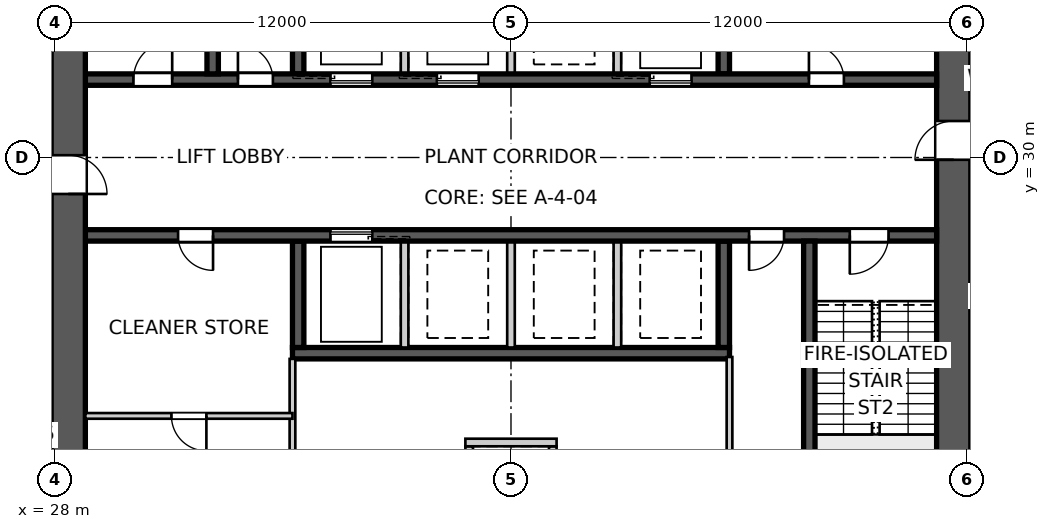
"""IFC4 building model, lengths in metres.
Left out: names, types, materials, properties, quantities, classifications, styles, units other than length and angle.
Written with IfcOpenShell. Run it as: python <this file> out.ifc"""

import sys

from ifc_helpers import new_model, si_unit, direction, frame, frame_2d, origin, place, context, subcontext, project, spatial, polyline, rectangle, outline, extrude, element, fill, save


model = new_model("IFC4")
c1 = context("Model", 3, precision=1e-05, world=origin(), true_north=direction((0.0, 1.0)))
c2 = subcontext(c1, "Body", "Model", "MODEL_VIEW")
j1 = project(units=[si_unit("LENGTHUNIT", "METRE"), si_unit("PLANEANGLEUNIT", "RADIAN")], contexts=[c1])
p1 = place(None, origin())
s1 = spatial("IfcSite", under=j1, at=p1, CompositionType="ELEMENT")
p2 = place(p1, origin())
s2 = spatial("IfcBuilding", under=s1, at=p2, CompositionType="ELEMENT")
p3 = place(p2, frame((0.0, 0.0, 74.4)))
s3 = spatial("IfcBuildingStorey", under=s2, at=p3, CompositionType="ELEMENT", Elevation=74.4)
p4 = place(p3, frame((51.65, 18.8, 0.0), z_axis=(0.0, 0.0, 1.0), x_axis=(0.0, 1.0, 0.0)))
e1 = element("IfcWall", 1, at=p4, inside=s3, PredefinedType="SHEAR", context=c2, shape_type="SweptSolid", body=[
    extrude(outline(polyline([(0.0, -0.45), (22.4, -0.45), (22.4, -0.025), (22.85, -0.025), (22.85, 0.025), (22.4, 0.025), (22.4, 0.45), (0.0, 0.45), (0.0, 0.025), (-0.45, 0.025), (-0.45, -0.025), (0.0, -0.025), (0.0, -0.45)])), origin(), (0.0, 0.0, 1.0), 5.0),
])
p5 = place(p4, frame((11.14, 0.0, 0.0)))
e2 = element("IfcOpeningElement", 2, at=p5, cuts=e1, PredefinedType="OPENING", context=c2, shape_type="SweptSolid", body=[
    extrude(rectangle(XDim=1.02, YDim=2.4, at=frame_2d((0.51, 1.2))), frame((0.0, 0.46, 0.0), z_axis=(0.0, -1.0, 0.0), x_axis=(1.0, 0.0, 0.0)), (0.0, 0.0, 1.0), 0.92),
])
p6 = place(p3, frame((28.35, 41.2, 0.0), z_axis=(0.0, 0.0, 1.0), x_axis=(0.0, -1.0, 0.0)))
e3 = element("IfcWall", 3, at=p6, inside=s3, PredefinedType="SHEAR", context=c2, shape_type="SweptSolid", body=[
    extrude(outline(polyline([(0.0, -0.45), (22.4, -0.45), (22.4, -0.025), (22.85, -0.025), (22.85, 0.025), (22.4, 0.025), (22.4, 0.45), (0.0, 0.45), (0.0, 0.025), (-0.45, 0.025), (-0.45, -0.025), (0.0, -0.025), (0.0, -0.45)])), origin(), (0.0, 0.0, 1.0), 5.0),
])
p7 = place(p6, frame((11.14, 0.0, 0.0)))
e4 = element("IfcOpeningElement", 4, at=p7, cuts=e3, PredefinedType="OPENING", context=c2, shape_type="SweptSolid", body=[
    extrude(rectangle(XDim=1.02, YDim=2.4, at=frame_2d((0.51, 1.2))), frame((0.0, 0.46, 0.0), z_axis=(0.0, -1.0, 0.0), x_axis=(1.0, 0.0, 0.0)), (0.0, 0.0, 1.0), 0.92),
])
p8 = place(p3, frame((28.8, 32.05, 0.0), z_axis=(0.0, 0.0, 1.0), x_axis=(1.0, 0.0, 0.0)))
e5 = element("IfcWall", 5, at=p8, inside=s3, PredefinedType="SHEAR", context=c2, shape_type="SweptSolid", body=[
    extrude(rectangle(XDim=22.4, YDim=0.3, at=frame_2d((11.2, 0.0))), origin(), (0.0, 0.0, 1.0), 5.0),
])
p9 = place(p8, frame((19.04, 0.0, 0.0)))
e6 = element("IfcOpeningElement", 6, at=p9, cuts=e5, PredefinedType="OPENING", context=c2, shape_type="SweptSolid", body=[
    extrude(rectangle(XDim=0.92, YDim=2.1, at=frame_2d((0.46, 1.05))), frame((0.0, 0.16, 0.0), z_axis=(0.0, -1.0, 0.0), x_axis=(1.0, 0.0, 0.0)), (0.0, 0.0, 1.0), 0.32),
])
p10 = place(p8, frame((1.265, 0.0, 0.0)))
e7 = element("IfcOpeningElement", 7, at=p10, cuts=e5, PredefinedType="OPENING", context=c2, shape_type="SweptSolid", body=[
    extrude(rectangle(XDim=1.02, YDim=2.1, at=frame_2d((0.51, 1.05))), frame((0.0, 0.16, 0.0), z_axis=(0.0, -1.0, 0.0), x_axis=(1.0, 0.0, 0.0)), (0.0, 0.0, 1.0), 0.32),
])
p11 = place(p8, frame((4.015, 0.0, 0.0)))
e8 = element("IfcOpeningElement", 8, at=p11, cuts=e5, PredefinedType="OPENING", context=c2, shape_type="SweptSolid", body=[
    extrude(rectangle(XDim=0.92, YDim=2.1, at=frame_2d((0.46, 1.05))), frame((0.0, 0.16, 0.0), z_axis=(0.0, -1.0, 0.0), x_axis=(1.0, 0.0, 0.0)), (0.0, 0.0, 1.0), 0.32),
])
p12 = place(p8, frame((6.45, 0.0, 0.0)))
e9 = element("IfcOpeningElement", 9, at=p12, cuts=e5, PredefinedType="OPENING", context=c2, shape_type="SweptSolid", body=[
    extrude(rectangle(XDim=1.1, YDim=2.1, at=frame_2d((0.55, 1.05))), frame((0.0, 0.16, 0.0), z_axis=(0.0, -1.0, 0.0), x_axis=(1.0, 0.0, 0.0)), (0.0, 0.0, 1.0), 0.32),
])
p13 = place(p8, frame((9.25, 0.0, 0.0)))
e10 = element("IfcOpeningElement", 10, at=p13, cuts=e5, PredefinedType="OPENING", context=c2, shape_type="SweptSolid", body=[
    extrude(rectangle(XDim=1.1, YDim=2.1, at=frame_2d((0.55, 1.05))), frame((0.0, 0.16, 0.0), z_axis=(0.0, -1.0, 0.0), x_axis=(1.0, 0.0, 0.0)), (0.0, 0.0, 1.0), 0.32),
])
p14 = place(p8, frame((14.85, 0.0, 0.0)))
e11 = element("IfcOpeningElement", 11, at=p14, cuts=e5, PredefinedType="OPENING", context=c2, shape_type="SweptSolid", body=[
    extrude(rectangle(XDim=1.1, YDim=2.1, at=frame_2d((0.55, 1.05))), frame((0.0, 0.16, 0.0), z_axis=(0.0, -1.0, 0.0), x_axis=(1.0, 0.0, 0.0)), (0.0, 0.0, 1.0), 0.32),
])
p15 = place(p3, frame((51.2, 27.95, 0.0), z_axis=(0.0, 0.0, 1.0), x_axis=(-1.0, 0.0, 0.0)))
e12 = element("IfcWall", 12, at=p15, inside=s3, PredefinedType="SHEAR", context=c2, shape_type="SweptSolid", body=[
    extrude(rectangle(XDim=22.4, YDim=0.3, at=frame_2d((11.2, 0.0))), origin(), (0.0, 0.0, 1.0), 5.0),
])
p16 = place(p15, frame((19.04, 0.0, 0.0)))
e13 = element("IfcOpeningElement", 13, at=p16, cuts=e12, PredefinedType="OPENING", context=c2, shape_type="SweptSolid", body=[
    extrude(rectangle(XDim=0.92, YDim=2.1, at=frame_2d((0.46, 1.05))), frame((0.0, 0.16, 0.0), z_axis=(0.0, -1.0, 0.0), x_axis=(1.0, 0.0, 0.0)), (0.0, 0.0, 1.0), 0.32),
])
p17 = place(p15, frame((1.265, 0.0, 0.0)))
e14 = element("IfcOpeningElement", 14, at=p17, cuts=e12, PredefinedType="OPENING", context=c2, shape_type="SweptSolid", body=[
    extrude(rectangle(XDim=1.02, YDim=2.1, at=frame_2d((0.51, 1.05))), frame((0.0, 0.16, 0.0), z_axis=(0.0, -1.0, 0.0), x_axis=(1.0, 0.0, 0.0)), (0.0, 0.0, 1.0), 0.32),
])
p18 = place(p15, frame((4.015, 0.0, 0.0)))
e15 = element("IfcOpeningElement", 15, at=p18, cuts=e12, PredefinedType="OPENING", context=c2, shape_type="SweptSolid", body=[
    extrude(rectangle(XDim=0.92, YDim=2.1, at=frame_2d((0.46, 1.05))), frame((0.0, 0.16, 0.0), z_axis=(0.0, -1.0, 0.0), x_axis=(1.0, 0.0, 0.0)), (0.0, 0.0, 1.0), 0.32),
])
p19 = place(p15, frame((14.85, 0.0, 0.0)))
e16 = element("IfcOpeningElement", 16, at=p19, cuts=e12, PredefinedType="OPENING", context=c2, shape_type="SweptSolid", body=[
    extrude(rectangle(XDim=1.1, YDim=2.1, at=frame_2d((0.55, 1.05))), frame((0.0, 0.16, 0.0), z_axis=(0.0, -1.0, 0.0), x_axis=(1.0, 0.0, 0.0)), (0.0, 0.0, 1.0), 0.32),
])
p20 = place(p3, frame((45.75, 24.85, 0.0), z_axis=(0.0, 0.0, 1.0), x_axis=(-1.0, 0.0, 0.0)))
e17 = element("IfcWall", 17, at=p20, inside=s3, PredefinedType="SHEAR", context=c2, shape_type="SweptSolid", body=[
    extrude(rectangle(XDim=11.5, YDim=0.3, at=frame_2d((5.75, 0.0))), origin(), (0.0, 0.0, 1.0), 5.0),
])
for number, where, z_axis, x_axis in (
    (18, (34.4, 32.2, 0.0), (0.0, 0.0, 1.0), (0.0, 1.0, 0.0)),
    (19, (45.6, 27.8, 0.0), (0.0, 0.0, 1.0), (0.0, -1.0, 0.0)),
):
    element("IfcWall", number, at=place(p3, frame(where, z_axis=z_axis, x_axis=x_axis)), inside=s3, PredefinedType="SHEAR", context=c2, shape_type="SweptSolid", body=[
        extrude(rectangle(XDim=2.8, YDim=0.3, at=frame_2d((1.4, 0.0))), origin(), (0.0, 0.0, 1.0), 5.0),
    ])
for number, where, z_axis, x_axis in (
    (20, (37.2, 32.2, 0.0), (0.0, 0.0, 1.0), (0.0, 1.0, 0.0)),
    (21, (42.8, 27.8, 0.0), (0.0, 0.0, 1.0), (0.0, -1.0, 0.0)),
    (22, (40.0, 32.2, 0.0), (0.0, 0.0, 1.0), (0.0, 1.0, 0.0)),
    (23, (40.0, 27.8, 0.0), (0.0, 0.0, 1.0), (0.0, -1.0, 0.0)),
    (24, (42.8, 32.2, 0.0), (0.0, 0.0, 1.0), (0.0, 1.0, 0.0)),
    (25, (37.2, 27.8, 0.0), (0.0, 0.0, 1.0), (0.0, -1.0, 0.0)),
):
    element("IfcWall", number, at=place(p3, frame(where, z_axis=z_axis, x_axis=x_axis)), inside=s3, PredefinedType="SOLIDWALL", context=c2, shape_type="SweptSolid", body=[
        extrude(rectangle(XDim=2.8, YDim=0.2, at=frame_2d((1.4, 0.0))), origin(), (0.0, 0.0, 1.0), 5.0),
    ])
for number, where, z_axis, x_axis in (
    (26, (45.6, 32.2, 0.0), (0.0, 0.0, 1.0), (0.0, 1.0, 0.0)),
    (27, (34.4, 27.8, 0.0), (0.0, 0.0, 1.0), (0.0, -1.0, 0.0)),
):
    element("IfcWall", number, at=place(p3, frame(where, z_axis=z_axis, x_axis=x_axis)), inside=s3, PredefinedType="SHEAR", context=c2, shape_type="SweptSolid", body=[
        extrude(rectangle(XDim=2.8, YDim=0.3, at=frame_2d((1.4, 0.0))), origin(), (0.0, 0.0, 1.0), 5.0),
    ])
for number, where, z_axis, x_axis in (
    (28, (32.15, 32.2, 0.0), (0.0, 0.0, 1.0), (0.0, 1.0, 0.0)),
    (29, (47.85, 27.8, 0.0), (0.0, 0.0, 1.0), (0.0, -1.0, 0.0)),
):
    element("IfcWall", number, at=place(p3, frame(where, z_axis=z_axis, x_axis=x_axis)), inside=s3, PredefinedType="SHEAR", context=c2, shape_type="SweptSolid", body=[
        extrude(rectangle(XDim=7.7, YDim=0.3, at=frame_2d((3.85, 0.0))), origin(), (0.0, 0.0, 1.0), 5.0),
    ])
for number, where, z_axis, x_axis in (
    (30, (38.9, 22.4, 0.0), (0.0, 0.0, 1.0), (0.0, -1.0, 0.0)),
    (31, (41.1, 22.4, 0.0), (0.0, 0.0, 1.0), (0.0, -1.0, 0.0)),
):
    element("IfcWall", number, at=place(p3, frame(where, z_axis=z_axis, x_axis=x_axis)), inside=s3, PredefinedType="SOLIDWALL", context=c2, shape_type="SweptSolid", body=[
        extrude(rectangle(XDim=2.0, YDim=0.2, at=frame_2d((1.0, 0.0))), origin(), (0.0, 0.0, 1.0), 5.0),
    ])
p21 = place(p3, frame((38.8, 22.5, 0.0), z_axis=(0.0, 0.0, 1.0), x_axis=(1.0, 0.0, 0.0)))
e32 = element("IfcWall", 32, at=p21, inside=s3, PredefinedType="SOLIDWALL", context=c2, shape_type="SweptSolid", body=[
    extrude(rectangle(XDim=2.4, YDim=0.2, at=frame_2d((1.2, 0.0))), origin(), (0.0, 0.0, 1.0), 5.0),
])
p22 = place(p3, frame((45.75, 18.8, 0.0), z_axis=(0.0, 0.0, 1.0), x_axis=(0.0, 1.0, 0.0)))
e33 = element("IfcWall", 33, at=p22, inside=s3, PredefinedType="SOLIDWALL", context=c2, shape_type="SweptSolid", body=[
    extrude(rectangle(XDim=5.95, YDim=0.15, at=frame_2d((2.975, 0.0))), origin(), (0.0, 0.0, 1.0), 4.85),
])
p23 = place(p22, frame((2.515, 0.0, 0.0)))
e34 = element("IfcOpeningElement", 34, at=p23, cuts=e33, PredefinedType="OPENING", context=c2, shape_type="SweptSolid", body=[
    extrude(rectangle(XDim=0.92, YDim=2.1, at=frame_2d((0.46, 1.05))), frame((0.0, 0.085, 0.0), z_axis=(0.0, -1.0, 0.0), x_axis=(1.0, 0.0, 0.0)), (0.0, 0.0, 1.0), 0.17),
])
p24 = place(p3, frame((34.25, 18.8, 0.0), z_axis=(0.0, 0.0, 1.0), x_axis=(0.0, 1.0, 0.0)))
e35 = element("IfcWall", 35, at=p24, inside=s3, PredefinedType="SOLIDWALL", context=c2, shape_type="SweptSolid", body=[
    extrude(rectangle(XDim=5.9, YDim=0.15, at=frame_2d((2.95, 0.0))), origin(), (0.0, 0.0, 1.0), 4.85),
])
p25 = place(p3, frame((34.25, 23.2, 0.0), z_axis=(0.0, 0.0, 1.0), x_axis=(-1.0, 0.0, 0.0)))
e36 = element("IfcWall", 36, at=p25, inside=s3, PredefinedType="SOLIDWALL", context=c2, shape_type="SweptSolid", body=[
    extrude(rectangle(XDim=5.45, YDim=0.15, at=frame_2d((2.725, 0.0))), origin(), (0.0, 0.0, 1.0), 4.85),
])
p26 = place(p25, frame((2.265, 0.0, 0.0)))
e37 = element("IfcOpeningElement", 37, at=p26, cuts=e36, PredefinedType="OPENING", context=c2, shape_type="SweptSolid", body=[
    extrude(rectangle(XDim=0.92, YDim=2.1, at=frame_2d((0.46, 1.05))), frame((0.0, 0.085, 0.0), z_axis=(0.0, -1.0, 0.0), x_axis=(1.0, 0.0, 0.0)), (0.0, 0.0, 1.0), 0.17),
])
p27 = place(p9, origin())
e38 = element("IfcDoor", 38, at=p27, inside=s3, OperationType="SINGLE_SWING_LEFT", PredefinedType="DOOR", context=c2, shape_type="SweptSolid", body=[
    extrude(rectangle(XDim=0.92, YDim=2.1, at=frame_2d((0.46, 1.05))), frame((0.0, 0.025, 0.0), z_axis=(0.0, -1.0, 0.0), x_axis=(1.0, 0.0, 0.0)), (0.0, 0.0, 1.0), 0.05),
])
fill(e6, e38)
p28 = place(p16, origin())
e39 = element("IfcDoor", 39, at=p28, inside=s3, OperationType="SINGLE_SWING_LEFT", PredefinedType="DOOR", context=c2, shape_type="SweptSolid", body=[
    extrude(rectangle(XDim=0.92, YDim=2.1, at=frame_2d((0.46, 1.05))), frame((0.0, 0.025, 0.0), z_axis=(0.0, -1.0, 0.0), x_axis=(1.0, 0.0, 0.0)), (0.0, 0.0, 1.0), 0.05),
])
fill(e13, e39)
p29 = place(p17, origin())
e40 = element("IfcDoor", 40, at=p29, inside=s3, OperationType="SINGLE_SWING_RIGHT", PredefinedType="DOOR", context=c2, shape_type="SweptSolid", body=[
    extrude(rectangle(XDim=1.02, YDim=2.1, at=frame_2d((0.51, 1.05))), frame((0.0, 0.025, 0.0), z_axis=(0.0, -1.0, 0.0), x_axis=(1.0, 0.0, 0.0)), (0.0, 0.0, 1.0), 0.05),
])
fill(e14, e40)
p30 = place(p10, origin())
e41 = element("IfcDoor", 41, at=p30, inside=s3, OperationType="SINGLE_SWING_RIGHT", PredefinedType="DOOR", context=c2, shape_type="SweptSolid", body=[
    extrude(rectangle(XDim=1.02, YDim=2.1, at=frame_2d((0.51, 1.05))), frame((0.0, 0.025, 0.0), z_axis=(0.0, -1.0, 0.0), x_axis=(1.0, 0.0, 0.0)), (0.0, 0.0, 1.0), 0.05),
])
fill(e7, e41)
p31 = place(p11, origin())
e42 = element("IfcDoor", 42, at=p31, inside=s3, OperationType="SINGLE_SWING_LEFT", PredefinedType="DOOR", context=c2, shape_type="SweptSolid", body=[
    extrude(rectangle(XDim=0.92, YDim=2.1, at=frame_2d((0.46, 1.05))), frame((0.0, 0.025, 0.0), z_axis=(0.0, -1.0, 0.0), x_axis=(1.0, 0.0, 0.0)), (0.0, 0.0, 1.0), 0.05),
])
fill(e8, e42)
p32 = place(p18, origin())
e43 = element("IfcDoor", 43, at=p32, inside=s3, OperationType="SINGLE_SWING_RIGHT", PredefinedType="DOOR", context=c2, shape_type="SweptSolid", body=[
    extrude(rectangle(XDim=0.92, YDim=2.1, at=frame_2d((0.46, 1.05))), frame((0.0, 0.025, 0.0), z_axis=(0.0, -1.0, 0.0), x_axis=(1.0, 0.0, 0.0)), (0.0, 0.0, 1.0), 0.05),
])
fill(e15, e43)
p33 = place(p26, origin())
e44 = element("IfcDoor", 44, at=p33, inside=s3, OperationType="SINGLE_SWING_LEFT", PredefinedType="DOOR", context=c2, shape_type="SweptSolid", body=[
    extrude(rectangle(XDim=0.92, YDim=2.1, at=frame_2d((0.46, 1.05))), frame((0.0, 0.025, 0.0), z_axis=(0.0, -1.0, 0.0), x_axis=(1.0, 0.0, 0.0)), (0.0, 0.0, 1.0), 0.05),
])
fill(e37, e44)
p34 = place(p5, origin())
e45 = element("IfcDoor", 45, at=p34, inside=s3, OperationType="SINGLE_SWING_LEFT", PredefinedType="DOOR", context=c2, shape_type="SweptSolid", body=[
    extrude(rectangle(XDim=1.02, YDim=2.4, at=frame_2d((0.51, 1.2))), frame((0.0, 0.025, 0.0), z_axis=(0.0, -1.0, 0.0), x_axis=(1.0, 0.0, 0.0)), (0.0, 0.0, 1.0), 0.05),
])
fill(e2, e45)
p35 = place(p7, origin())
e46 = element("IfcDoor", 46, at=p35, inside=s3, OperationType="SINGLE_SWING_RIGHT", PredefinedType="DOOR", context=c2, shape_type="SweptSolid", body=[
    extrude(rectangle(XDim=1.02, YDim=2.4, at=frame_2d((0.51, 1.2))), frame((0.0, 0.025, 0.0), z_axis=(0.0, -1.0, 0.0), x_axis=(1.0, 0.0, 0.0)), (0.0, 0.0, 1.0), 0.05),
])
fill(e4, e46)
p36 = place(p12, origin())
e47 = element("IfcDoor", 47, at=p36, inside=s3, OperationType="SLIDING_TO_LEFT", PredefinedType="DOOR", context=c2, shape_type="SweptSolid", body=[
    extrude(rectangle(XDim=1.1, YDim=2.1, at=frame_2d((0.55, 1.05))), frame((0.0, 0.025, 0.0), z_axis=(0.0, -1.0, 0.0), x_axis=(1.0, 0.0, 0.0)), (0.0, 0.0, 1.0), 0.05),
])
fill(e9, e47)
p37 = place(p13, origin())
e48 = element("IfcDoor", 48, at=p37, inside=s3, OperationType="SLIDING_TO_LEFT", PredefinedType="DOOR", context=c2, shape_type="SweptSolid", body=[
    extrude(rectangle(XDim=1.1, YDim=2.1, at=frame_2d((0.55, 1.05))), frame((0.0, 0.025, 0.0), z_axis=(0.0, -1.0, 0.0), x_axis=(1.0, 0.0, 0.0)), (0.0, 0.0, 1.0), 0.05),
])
fill(e10, e48)
p38 = place(p14, origin())
e49 = element("IfcDoor", 49, at=p38, inside=s3, OperationType="SLIDING_TO_LEFT", PredefinedType="DOOR", context=c2, shape_type="SweptSolid", body=[
    extrude(rectangle(XDim=1.1, YDim=2.1, at=frame_2d((0.55, 1.05))), frame((0.0, 0.025, 0.0), z_axis=(0.0, -1.0, 0.0), x_axis=(1.0, 0.0, 0.0)), (0.0, 0.0, 1.0), 0.05),
])
fill(e11, e49)
p39 = place(p19, origin())
e50 = element("IfcDoor", 50, at=p39, inside=s3, OperationType="SLIDING_TO_LEFT", PredefinedType="DOOR", context=c2, shape_type="SweptSolid", body=[
    extrude(rectangle(XDim=1.1, YDim=2.1, at=frame_2d((0.55, 1.05))), frame((0.0, 0.025, 0.0), z_axis=(0.0, -1.0, 0.0), x_axis=(1.0, 0.0, 0.0)), (0.0, 0.0, 1.0), 0.05),
])
fill(e16, e50)
save(model, sys.argv[1])
